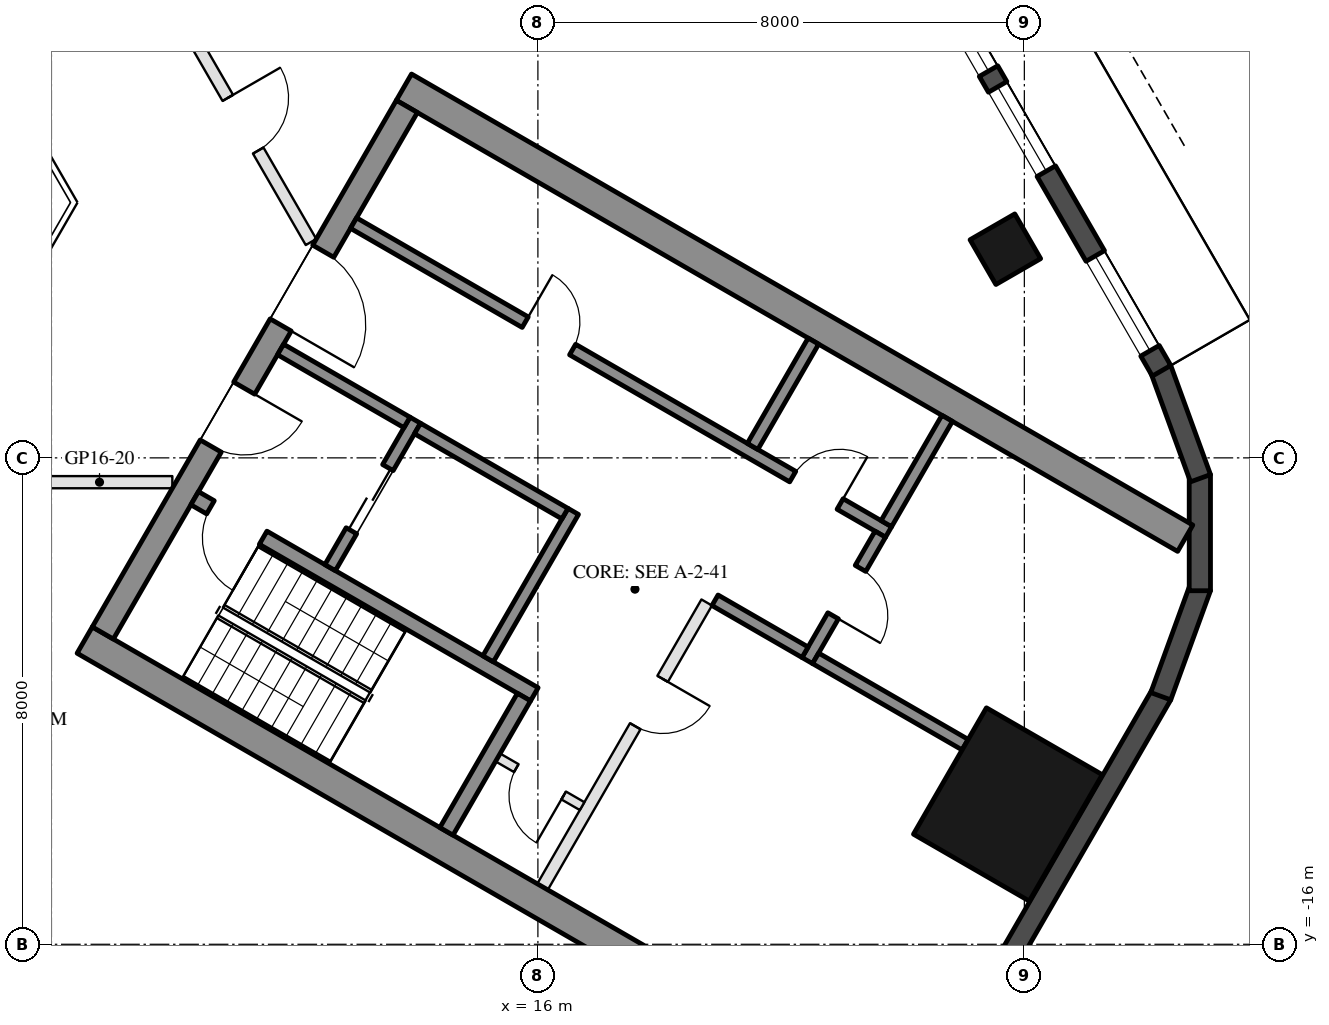
"""IFC4 building model, lengths in metres.
Left out: names, types, materials, properties, quantities, classifications, styles, units other than length and angle.
Written with IfcOpenShell. Run it as: python <this file> out.ifc"""

import sys

from ifc_helpers import new_model, si_unit, direction, frame, frame_2d, origin, origin_2d, place, context, subcontext, project, spatial, rectangle, hollow_rectangle, extrude, element, fill, save


model = new_model("IFC4")
c1 = context("Model", 3, precision=1e-05, world=origin(), true_north=direction((0.0, 1.0)))
c2 = subcontext(c1, "Body", "Model", "MODEL_VIEW")
j1 = project(units=[si_unit("LENGTHUNIT", "METRE"), si_unit("PLANEANGLEUNIT", "RADIAN")], contexts=[c1])
p1 = place(None, origin())
s1 = spatial("IfcSite", under=j1, at=p1, CompositionType="ELEMENT")
p2 = place(p1, origin())
s2 = spatial("IfcBuilding", under=s1, at=p2, CompositionType="ELEMENT")
p3 = place(p2, frame((0.0, 0.0, 176.2)))
s3 = spatial("IfcBuildingStorey", under=s2, at=p3, CompositionType="ELEMENT", Elevation=176.2)
p4 = place(p3, frame((23.688, -4.568, 0.0), z_axis=(0.0, 0.0, 1.0), x_axis=(-0.5, 0.866025403784, 0.0)))
e1 = element("IfcColumn", 1, at=p4, inside=s3, PredefinedType="COLUMN", context=c2, shape_type="SweptSolid", body=[
    extrude(hollow_rectangle(XDim=0.85, YDim=0.85, WallThickness=0.04, at=origin_2d()), origin(), (0.0, 0.0, 1.0), 3.7),
])
p5 = place(p3, frame((23.729, -13.7, 0.0), z_axis=(0.0, 0.0, 1.0), x_axis=(0.5, 0.866025403784, 0.0)))
e2 = element("IfcColumn", 2, at=p5, inside=s3, PredefinedType="COLUMN", context=c2, shape_type="SweptSolid", body=[
    extrude(hollow_rectangle(XDim=2.4, YDim=2.2, WallThickness=0.06, at=origin_2d()), origin(), (0.0, 0.0, 1.0), 3.7),
])
p6 = place(p3, frame((23.427, -16.792, 0.0), z_axis=(0.0, 0.0, 1.0), x_axis=(0.500018773155, 0.866014564827, 0.0)))
e3 = element("IfcWall", 3, at=p6, inside=s3, PredefinedType="SOLIDWALL", context=c2, shape_type="SweptSolid", body=[
    extrude(rectangle(XDim=5.658, YDim=0.35, at=frame_2d((2.829, 0.0))), origin(), (0.0, 0.0, 1.0), 3.55),
])
for number, where, z_axis, x_axis in (
    (4, (26.244, -11.92, 0.0), (0.0, 0.0, 1.0), (0.342, 0.94, 0.0)),
    (5, (26.886, -10.185, 0.0), (0.0, 0.0, 1.0), (0.0, 1.0, 0.0)),
    (6, (26.897, -8.335, 0.0), (0.0, 0.0, 1.0), (-0.342, 0.94, 0.0)),
):
    element("IfcWall", number, at=place(p3, frame(where, z_axis=z_axis, x_axis=x_axis)), inside=s3, PredefinedType="SOLIDWALL", context=c2, shape_type="SweptSolid", body=[
        extrude(rectangle(XDim=1.91, YDim=0.35, at=frame_2d((0.955, 0.0))), origin(), (0.0, 0.0, 1.0), 3.55),
    ])
p7 = place(p3, frame((26.257, -6.567, 0.0), z_axis=(0.0, 0.0, 1.0), x_axis=(-0.500023526245, 0.866011820475, 0.0)))
e7 = element("IfcWall", 7, at=p7, inside=s3, PredefinedType="SOLIDWALL", context=c2, shape_type="SweptSolid", body=[
    extrude(rectangle(XDim=11.816, YDim=0.35, at=frame_2d((5.908, 0.0))), origin(), (0.0, 0.0, 1.0), 3.55),
])
p8 = place(p7, frame((0.38, 0.0, 0.3)))
e8 = element("IfcOpeningElement", 8, at=p8, cuts=e7, PredefinedType="OPENING", context=c2, shape_type="SweptSolid", body=[
    extrude(rectangle(XDim=1.8, YDim=2.65, at=frame_2d((0.9, 1.325))), frame((0.0, 0.185, 0.0), z_axis=(0.0, -1.0, 0.0), x_axis=(1.0, 0.0, 0.0)), (0.0, 0.0, 1.0), 0.37),
])
p9 = place(p7, frame((7.741, 0.0, 0.0)))
e9 = element("IfcOpeningElement", 9, at=p9, cuts=e7, PredefinedType="OPENING", context=c2, shape_type="SweptSolid", body=[
    extrude(rectangle(XDim=2.4, YDim=2.4, at=frame_2d((1.2, 1.2))), frame((0.0, 0.185, 0.0), z_axis=(0.0, -1.0, 0.0), x_axis=(1.0, 0.0, 0.0)), (0.0, 0.0, 1.0), 0.37),
])
p10 = place(p7, frame((3.791, 0.0, 0.3)))
e10 = element("IfcOpeningElement", 10, at=p10, cuts=e7, PredefinedType="OPENING", context=c2, shape_type="SweptSolid", body=[
    extrude(rectangle(XDim=1.6, YDim=2.65, at=frame_2d((0.8, 1.325))), frame((0.0, 0.185, 0.0), z_axis=(0.0, -1.0, 0.0), x_axis=(1.0, 0.0, 0.0)), (0.0, 0.0, 1.0), 0.37),
])
p11 = place(p7, frame((5.691, 0.0, 0.3)))
e11 = element("IfcOpeningElement", 11, at=p11, cuts=e7, PredefinedType="OPENING", context=c2, shape_type="SweptSolid", body=[
    extrude(rectangle(XDim=1.6, YDim=2.65, at=frame_2d((0.8, 1.325))), frame((0.0, 0.185, 0.0), z_axis=(0.0, -1.0, 0.0), x_axis=(1.0, 0.0, 0.0)), (0.0, 0.0, 1.0), 0.37),
])
for number, where, z_axis, x_axis in (
    (12, (8.547, -10.997, 0.0), (0.0, 0.0, 1.0), (0.866, -0.5, 0.0)),
    (13, (13.797, -1.903, 0.0), (0.0, 0.0, 1.0), (0.866, -0.5, 0.0)),
):
    element("IfcWall", number, at=place(p3, frame(where, z_axis=z_axis, x_axis=x_axis)), inside=s3, PredefinedType="SHEAR", context=c2, shape_type="SweptSolid", body=[
        extrude(rectangle(XDim=14.837, YDim=0.5, at=frame_2d((7.418, 0.0))), origin(), (0.0, 0.0, 1.0), 3.5),
    ])
p12 = place(p3, frame((8.845, -10.88, 0.0), z_axis=(0.0, 0.0, 1.0), x_axis=(0.500004234368, 0.866022959057, 0.0)))
e14 = element("IfcWall", 14, at=p12, inside=s3, PredefinedType="SHEAR", context=c2, shape_type="SweptSolid", body=[
    extrude(rectangle(XDim=10.0, YDim=0.4, at=frame_2d((5.0, 0.0))), origin(), (0.0, 0.0, 1.0), 3.5),
])
p13 = place(p12, frame((3.55, 0.0, 0.0)))
e15 = element("IfcOpeningElement", 15, at=p13, cuts=e14, PredefinedType="OPENING", context=c2, shape_type="SweptSolid", body=[
    extrude(rectangle(XDim=1.1, YDim=2.1, at=frame_2d((0.55, 1.05))), frame((0.0, 0.21, 0.0), z_axis=(0.0, -1.0, 0.0), x_axis=(1.0, 0.0, 0.0)), (0.0, 0.0, 1.0), 0.42),
])
p14 = place(p12, frame((5.85, 0.0, 0.0)))
e16 = element("IfcOpeningElement", 16, at=p14, cuts=e14, PredefinedType="OPENING", context=c2, shape_type="SweptSolid", body=[
    extrude(rectangle(XDim=1.4, YDim=2.1, at=frame_2d((0.7, 1.05))), frame((0.0, 0.21, 0.0), z_axis=(0.0, -1.0, 0.0), x_axis=(1.0, 0.0, 0.0)), (0.0, 0.0, 1.0), 0.42),
])
p15 = place(p3, frame((10.356, -8.664, 0.0), z_axis=(0.0, 0.0, 1.0), x_axis=(0.866028629588, -0.499994412703, 0.0)))
e17 = element("IfcWall", 17, at=p15, inside=s3, PredefinedType="SHEAR", context=c2, shape_type="SweptSolid", body=[
    extrude(rectangle(XDim=6.45, YDim=0.25, at=frame_2d((3.225, 0.0))), origin(), (0.0, 0.0, 1.0), 3.5),
])
p16 = place(p15, frame((0.3, 0.0, 0.0)))
e18 = element("IfcOpeningElement", 18, at=p16, cuts=e17, PredefinedType="OPENING", context=c2, shape_type="SweptSolid", body=[
    extrude(rectangle(XDim=1.0, YDim=2.1, at=frame_2d((0.5, 1.05))), frame((0.0, 0.135, 0.0), z_axis=(0.0, -1.0, 0.0), x_axis=(1.0, 0.0, 0.0)), (0.0, 0.0, 1.0), 0.27),
])
p17 = place(p3, frame((14.496, -14.143, 0.0), z_axis=(0.0, 0.0, 1.0), x_axis=(0.500062241894, 0.865989465428, 0.0)))
e19 = element("IfcWall", 19, at=p17, inside=s3, PredefinedType="SHEAR", context=c2, shape_type="SweptSolid", body=[
    extrude(rectangle(XDim=2.55, YDim=0.25, at=frame_2d((1.275, 0.0))), origin(), (0.0, 0.0, 1.0), 3.5),
])
p18 = place(p3, frame((15.181, -11.305, 0.0), z_axis=(0.0, 0.0, 1.0), x_axis=(0.49994636267, 0.866056369097, 0.0)))
e20 = element("IfcWall", 20, at=p18, inside=s3, PredefinedType="SHEAR", context=c2, shape_type="SweptSolid", body=[
    extrude(rectangle(XDim=2.8, YDim=0.2, at=frame_2d((1.4, 0.0))), origin(), (0.0, 0.0, 1.0), 3.5),
])
p19 = place(p3, frame((12.583, -9.805, 0.0), z_axis=(0.0, 0.0, 1.0), x_axis=(0.49994636267, 0.866056369097, 0.0)))
e21 = element("IfcWall", 21, at=p19, inside=s3, PredefinedType="SHEAR", context=c2, shape_type="SweptSolid", body=[
    extrude(rectangle(XDim=2.8, YDim=0.2, at=frame_2d((1.4, 0.0))), origin(), (0.0, 0.0, 1.0), 3.5),
])
p20 = place(p19, frame((0.7, 0.0, 0.0)))
e22 = element("IfcOpeningElement", 22, at=p20, cuts=e21, PredefinedType="OPENING", context=c2, shape_type="SweptSolid", body=[
    extrude(rectangle(XDim=1.2, YDim=2.1, at=frame_2d((0.6, 1.05))), frame((0.0, 0.11, 0.0), z_axis=(0.0, -1.0, 0.0), x_axis=(1.0, 0.0, 0.0)), (0.0, 0.0, 1.0), 0.22),
])
p21 = place(p3, frame((11.768, -6.217, 0.0), z_axis=(0.0, 0.0, 1.0), x_axis=(0.866050077142, -0.499957262057, 0.0)))
e23 = element("IfcWall", 23, at=p21, inside=s3, PredefinedType="SHEAR", context=c2, shape_type="SweptSolid", body=[
    extrude(rectangle(XDim=2.4, YDim=0.2, at=frame_2d((1.2, 0.0))), origin(), (0.0, 0.0, 1.0), 3.5),
])
p22 = place(p3, frame((14.02, -7.517, 0.0), z_axis=(0.0, 0.0, 1.0), x_axis=(0.866034573852, -0.49998411664, 0.0)))
e24 = element("IfcWall", 24, at=p22, inside=s3, PredefinedType="SHEAR", context=c2, shape_type="SweptSolid", body=[
    extrude(rectangle(XDim=2.8, YDim=0.2, at=frame_2d((1.4, 0.0))), origin(), (0.0, 0.0, 1.0), 3.5),
])
p23 = place(p3, frame((12.968, -4.138, 0.0), z_axis=(0.0, 0.0, 1.0), x_axis=(0.866028328073, -0.49999493495, 0.0)))
e25 = element("IfcWall", 25, at=p23, inside=s3, PredefinedType="SHEAR", context=c2, shape_type="SweptSolid", body=[
    extrude(rectangle(XDim=10.16, YDim=0.2, at=frame_2d((5.08, 0.0))), origin(), (0.0, 0.0, 1.0), 3.5),
])
p24 = place(p23, frame((3.26, 0.0, 0.0)))
e26 = element("IfcOpeningElement", 26, at=p24, cuts=e25, PredefinedType="OPENING", context=c2, shape_type="SweptSolid", body=[
    extrude(rectangle(XDim=0.9, YDim=2.1, at=frame_2d((0.45, 1.05))), frame((0.0, 0.11, 0.0), z_axis=(0.0, -1.0, 0.0), x_axis=(1.0, 0.0, 0.0)), (0.0, 0.0, 1.0), 0.22),
])
p25 = place(p23, frame((8.34, 0.0, 0.0)))
e27 = element("IfcOpeningElement", 27, at=p25, cuts=e25, PredefinedType="OPENING", context=c2, shape_type="SweptSolid", body=[
    extrude(rectangle(XDim=0.9, YDim=2.1, at=frame_2d((0.45, 1.05))), frame((0.0, 0.11, 0.0), z_axis=(0.0, -1.0, 0.0), x_axis=(1.0, 0.0, 0.0)), (0.0, 0.0, 1.0), 0.22),
])
p26 = place(p3, frame((20.43, -11.333, 0.0), z_axis=(0.0, 0.0, 1.0), x_axis=(0.500001309137, 0.866024647952, 0.0)))
e28 = element("IfcWall", 28, at=p26, inside=s3, PredefinedType="SHEAR", context=c2, shape_type="SweptSolid", body=[
    extrude(rectangle(XDim=2.4, YDim=0.2, at=frame_2d((1.2, 0.0))), origin(), (0.0, 0.0, 1.0), 3.5),
])
p27 = place(p26, frame((0.85, 0.0, 0.0)))
e29 = element("IfcOpeningElement", 29, at=p27, cuts=e28, PredefinedType="OPENING", context=c2, shape_type="SweptSolid", body=[
    extrude(rectangle(XDim=0.9, YDim=2.1, at=frame_2d((0.45, 1.05))), frame((0.0, 0.11, 0.0), z_axis=(0.0, -1.0, 0.0), x_axis=(1.0, 0.0, 0.0)), (0.0, 0.0, 1.0), 0.22),
])
p28 = place(p3, frame((18.913, -10.342, 0.0), z_axis=(0.0, 0.0, 1.0), x_axis=(0.866038183914, -0.499977863513, 0.0)))
e30 = element("IfcWall", 30, at=p28, inside=s3, PredefinedType="SHEAR", context=c2, shape_type="SweptSolid", body=[
    extrude(rectangle(XDim=1.71, YDim=0.2, at=frame_2d((0.855, 0.0))), origin(), (0.0, 0.0, 1.0), 3.5),
])
for number, where, z_axis, x_axis in (
    (31, (19.531, -7.812, 0.0), (0.0, 0.0, 1.0), (0.5, 0.866, 0.0)),
    (32, (21.73, -9.082, 0.0), (0.0, 0.0, 1.0), (0.5, 0.866, 0.0)),
):
    element("IfcWall", number, at=place(p3, frame(where, z_axis=z_axis, x_axis=x_axis)), inside=s3, PredefinedType="SHEAR", context=c2, shape_type="SweptSolid", body=[
        extrude(rectangle(XDim=2.0, YDim=0.2, at=frame_2d((1.0, 0.0))), origin(), (0.0, 0.0, 1.0), 3.5),
    ])
p29 = place(p3, frame((20.567, -11.297, 0.0), z_axis=(0.0, 0.0, 1.0), x_axis=(0.866055327414, -0.49994816717, 0.0)))
e33 = element("IfcWall", 33, at=p29, inside=s3, PredefinedType="SHEAR", context=c2, shape_type="SweptSolid", body=[
    extrude(rectangle(XDim=2.84, YDim=0.2, at=frame_2d((1.42, 0.0))), origin(), (0.0, 0.0, 1.0), 3.5),
])
p30 = place(p3, frame((16.076, -15.055, 0.0), z_axis=(0.0, 0.0, 1.0), x_axis=(0.499995103361, 0.866028230842, 0.0)))
e34 = element("IfcWall", 34, at=p30, inside=s3, PredefinedType="PARTITIONING", context=c2, shape_type="SweptSolid", body=[
    extrude(rectangle(XDim=5.4, YDim=0.2, at=frame_2d((2.7, 0.0))), origin(), (0.0, 0.0, 1.0), 3.5),
])
p31 = place(p30, frame((3.05, 0.0, 0.0)))
e35 = element("IfcOpeningElement", 35, at=p31, cuts=e34, PredefinedType="OPENING", context=c2, shape_type="SweptSolid", body=[
    extrude(rectangle(XDim=0.9, YDim=2.1, at=frame_2d((0.45, 1.05))), frame((0.0, 0.11, 0.0), z_axis=(0.0, -1.0, 0.0), x_axis=(1.0, 0.0, 0.0)), (0.0, 0.0, 1.0), 0.22),
])
p32 = place(p3, frame((15.342, -12.928, 0.0), z_axis=(0.0, 0.0, 1.0), x_axis=(0.865989903783, -0.500061482766, 0.0)))
e36 = element("IfcWall", 36, at=p32, inside=s3, PredefinedType="PARTITIONING", context=c2, shape_type="SweptSolid", body=[
    extrude(rectangle(XDim=1.6, YDim=0.15, at=frame_2d((0.8, 0.0))), origin(), (0.0, 0.0, 1.0), 3.5),
])
p33 = place(p32, frame((0.35, 0.0, 0.0)))
e37 = element("IfcOpeningElement", 37, at=p33, cuts=e36, PredefinedType="OPENING", context=c2, shape_type="SweptSolid", body=[
    extrude(rectangle(XDim=0.9, YDim=2.1, at=frame_2d((0.45, 1.05))), frame((0.0, 0.085, 0.0), z_axis=(0.0, -1.0, 0.0), x_axis=(1.0, 0.0, 0.0)), (0.0, 0.0, 1.0), 0.17),
])
p34 = place(p3, frame((9.988, -8.4, 0.0), z_axis=(0.0, 0.0, 1.0), x_axis=(-1.0, 0.0, 0.0)))
e38 = element("IfcWall", 38, at=p34, inside=s3, PredefinedType="PARTITIONING", context=c2, shape_type="SweptSolid", body=[
    extrude(rectangle(XDim=5.989, YDim=0.2, at=frame_2d((2.994, 0.0))), origin(), (0.0, 0.0, 1.0), 2.95),
])
p35 = place(p34, frame((2.494, 0.0, 0.0)))
e39 = element("IfcOpeningElement", 39, at=p35, cuts=e38, PredefinedType="OPENING", context=c2, shape_type="SweptSolid", body=[
    extrude(rectangle(XDim=1.0, YDim=2.1, at=frame_2d((0.5, 1.05))), frame((0.0, 0.11, 0.0), z_axis=(0.0, -1.0, 0.0), x_axis=(1.0, 0.0, 0.0)), (0.0, 0.0, 1.0), 0.22),
])
p36 = place(p3, frame((10.032, -0.576, 0.0), z_axis=(0.0, 0.0, 1.0), x_axis=(0.500042097992, -0.866001097133, 0.0)))
e40 = element("IfcWall", 40, at=p36, inside=s3, PredefinedType="PARTITIONING", context=c2, shape_type="SweptSolid", body=[
    extrude(rectangle(XDim=4.474, YDim=0.2, at=frame_2d((2.237, 0.0))), origin(), (0.0, 0.0, 1.0), 2.95),
])
p37 = place(p36, frame((1.737, 0.0, 0.0)))
e41 = element("IfcOpeningElement", 41, at=p37, cuts=e40, PredefinedType="OPENING", context=c2, shape_type="SweptSolid", body=[
    extrude(rectangle(XDim=1.0, YDim=2.1, at=frame_2d((0.5, 1.05))), frame((0.0, 0.11, 0.0), z_axis=(0.0, -1.0, 0.0), x_axis=(1.0, 0.0, 0.0)), (0.0, 0.0, 1.0), 0.22),
])
p38 = place(p8, origin())
e42 = element("IfcWindow", 42, at=p38, inside=s3, PartitioningType="SINGLE_PANEL", PredefinedType="WINDOW", context=c2, shape_type="SweptSolid", body=[
    extrude(rectangle(XDim=1.8, YDim=2.65, at=frame_2d((0.9, 1.325))), frame((0.0, 0.03, 0.0), z_axis=(0.0, -1.0, 0.0), x_axis=(1.0, 0.0, 0.0)), (0.0, 0.0, 1.0), 0.06),
])
fill(e8, e42)
p39 = place(p10, origin())
e43 = element("IfcWindow", 43, at=p39, inside=s3, PartitioningType="SINGLE_PANEL", PredefinedType="WINDOW", context=c2, shape_type="SweptSolid", body=[
    extrude(rectangle(XDim=1.6, YDim=2.65, at=frame_2d((0.8, 1.325))), frame((0.0, 0.03, 0.0), z_axis=(0.0, -1.0, 0.0), x_axis=(1.0, 0.0, 0.0)), (0.0, 0.0, 1.0), 0.06),
])
fill(e10, e43)
p40 = place(p11, origin())
e44 = element("IfcWindow", 44, at=p40, inside=s3, PartitioningType="SINGLE_PANEL", PredefinedType="WINDOW", context=c2, shape_type="SweptSolid", body=[
    extrude(rectangle(XDim=1.6, YDim=2.65, at=frame_2d((0.8, 1.325))), frame((0.0, 0.03, 0.0), z_axis=(0.0, -1.0, 0.0), x_axis=(1.0, 0.0, 0.0)), (0.0, 0.0, 1.0), 0.06),
])
fill(e11, e44)
p41 = place(p20, origin())
e45 = element("IfcDoor", 45, at=p41, inside=s3, OperationType="DOUBLE_DOOR_SLIDING", PredefinedType="DOOR", context=c2, shape_type="SweptSolid", body=[
    extrude(rectangle(XDim=1.2, YDim=2.1, at=frame_2d((0.6, 1.05))), frame((0.0, 0.025, 0.0), z_axis=(0.0, -1.0, 0.0), x_axis=(1.0, 0.0, 0.0)), (0.0, 0.0, 1.0), 0.05),
])
fill(e22, e45)
p42 = place(p33, frame((0.9, 0.0, 0.0), z_axis=(0.0, 0.0, 1.0), x_axis=(-1.0, 0.0, 0.0)))
e46 = element("IfcDoor", 46, at=p42, inside=s3, OperationType="SINGLE_SWING_LEFT", PredefinedType="DOOR", context=c2, shape_type="SweptSolid", body=[
    extrude(rectangle(XDim=0.9, YDim=2.1, at=frame_2d((0.45, 1.05))), frame((0.0, 0.025, 0.0), z_axis=(0.0, -1.0, 0.0), x_axis=(1.0, 0.0, 0.0)), (0.0, 0.0, 1.0), 0.05),
])
fill(e37, e46)
p43 = place(p24, origin())
e47 = element("IfcDoor", 47, at=p43, inside=s3, OperationType="SINGLE_SWING_LEFT", PredefinedType="DOOR", context=c2, shape_type="SweptSolid", body=[
    extrude(rectangle(XDim=0.9, YDim=2.1, at=frame_2d((0.45, 1.05))), frame((0.0, 0.025, 0.0), z_axis=(0.0, -1.0, 0.0), x_axis=(1.0, 0.0, 0.0)), (0.0, 0.0, 1.0), 0.05),
])
fill(e26, e47)
p44 = place(p25, origin())
e48 = element("IfcDoor", 48, at=p44, inside=s3, OperationType="SINGLE_SWING_RIGHT", PredefinedType="DOOR", context=c2, shape_type="SweptSolid", body=[
    extrude(rectangle(XDim=0.9, YDim=2.1, at=frame_2d((0.45, 1.05))), frame((0.0, 0.025, 0.0), z_axis=(0.0, -1.0, 0.0), x_axis=(1.0, 0.0, 0.0)), (0.0, 0.0, 1.0), 0.05),
])
fill(e27, e48)
p45 = place(p27, frame((0.9, 0.0, 0.0), z_axis=(0.0, 0.0, 1.0), x_axis=(-1.0, 0.0, 0.0)))
e49 = element("IfcDoor", 49, at=p45, inside=s3, OperationType="SINGLE_SWING_RIGHT", PredefinedType="DOOR", context=c2, shape_type="SweptSolid", body=[
    extrude(rectangle(XDim=0.9, YDim=2.1, at=frame_2d((0.45, 1.05))), frame((0.0, 0.025, 0.0), z_axis=(0.0, -1.0, 0.0), x_axis=(1.0, 0.0, 0.0)), (0.0, 0.0, 1.0), 0.05),
])
fill(e29, e49)
p46 = place(p31, frame((0.9, 0.0, 0.0), z_axis=(0.0, 0.0, 1.0), x_axis=(-1.0, 0.0, 0.0)))
e50 = element("IfcDoor", 50, at=p46, inside=s3, OperationType="SINGLE_SWING_LEFT", PredefinedType="DOOR", context=c2, shape_type="SweptSolid", body=[
    extrude(rectangle(XDim=0.9, YDim=2.1, at=frame_2d((0.45, 1.05))), frame((0.0, 0.025, 0.0), z_axis=(0.0, -1.0, 0.0), x_axis=(1.0, 0.0, 0.0)), (0.0, 0.0, 1.0), 0.05),
])
fill(e35, e50)
p47 = place(p13, frame((1.1, 0.0, 0.0), z_axis=(0.0, 0.0, 1.0), x_axis=(-1.0, 0.0, 0.0)))
e51 = element("IfcDoor", 51, at=p47, inside=s3, OperationType="SINGLE_SWING_LEFT", PredefinedType="DOOR", context=c2, shape_type="SweptSolid", body=[
    extrude(rectangle(XDim=1.1, YDim=2.1, at=frame_2d((0.55, 1.05))), frame((0.0, 0.025, 0.0), z_axis=(0.0, -1.0, 0.0), x_axis=(1.0, 0.0, 0.0)), (0.0, 0.0, 1.0), 0.05),
])
fill(e15, e51)
p48 = place(p14, frame((1.4, 0.0, 0.0), z_axis=(0.0, 0.0, 1.0), x_axis=(-1.0, 0.0, 0.0)))
e52 = element("IfcDoor", 52, at=p48, inside=s3, OperationType="DOUBLE_DOOR_SINGLE_SWING", PredefinedType="DOOR", context=c2, shape_type="SweptSolid", body=[
    extrude(rectangle(XDim=1.4, YDim=2.1, at=frame_2d((0.7, 1.05))), frame((0.0, 0.025, 0.0), z_axis=(0.0, -1.0, 0.0), x_axis=(1.0, 0.0, 0.0)), (0.0, 0.0, 1.0), 0.05),
])
fill(e16, e52)
p49 = place(p16, frame((1.0, 0.0, 0.0), z_axis=(0.0, 0.0, 1.0), x_axis=(-1.0, 0.0, 0.0)))
e53 = element("IfcDoor", 53, at=p49, inside=s3, OperationType="SINGLE_SWING_LEFT", PredefinedType="DOOR", context=c2, shape_type="SweptSolid", body=[
    extrude(rectangle(XDim=1.0, YDim=2.1, at=frame_2d((0.5, 1.05))), frame((0.0, 0.025, 0.0), z_axis=(0.0, -1.0, 0.0), x_axis=(1.0, 0.0, 0.0)), (0.0, 0.0, 1.0), 0.05),
])
fill(e18, e53)
p50 = place(p37, origin())
e54 = element("IfcDoor", 54, at=p50, inside=s3, OperationType="SINGLE_SWING_LEFT", PredefinedType="DOOR", context=c2, shape_type="SweptSolid", body=[
    extrude(rectangle(XDim=1.0, YDim=2.1, at=frame_2d((0.5, 1.05))), frame((0.0, 0.025, 0.0), z_axis=(0.0, -1.0, 0.0), x_axis=(1.0, 0.0, 0.0)), (0.0, 0.0, 1.0), 0.05),
])
fill(e41, e54)
save(model, sys.argv[1])
